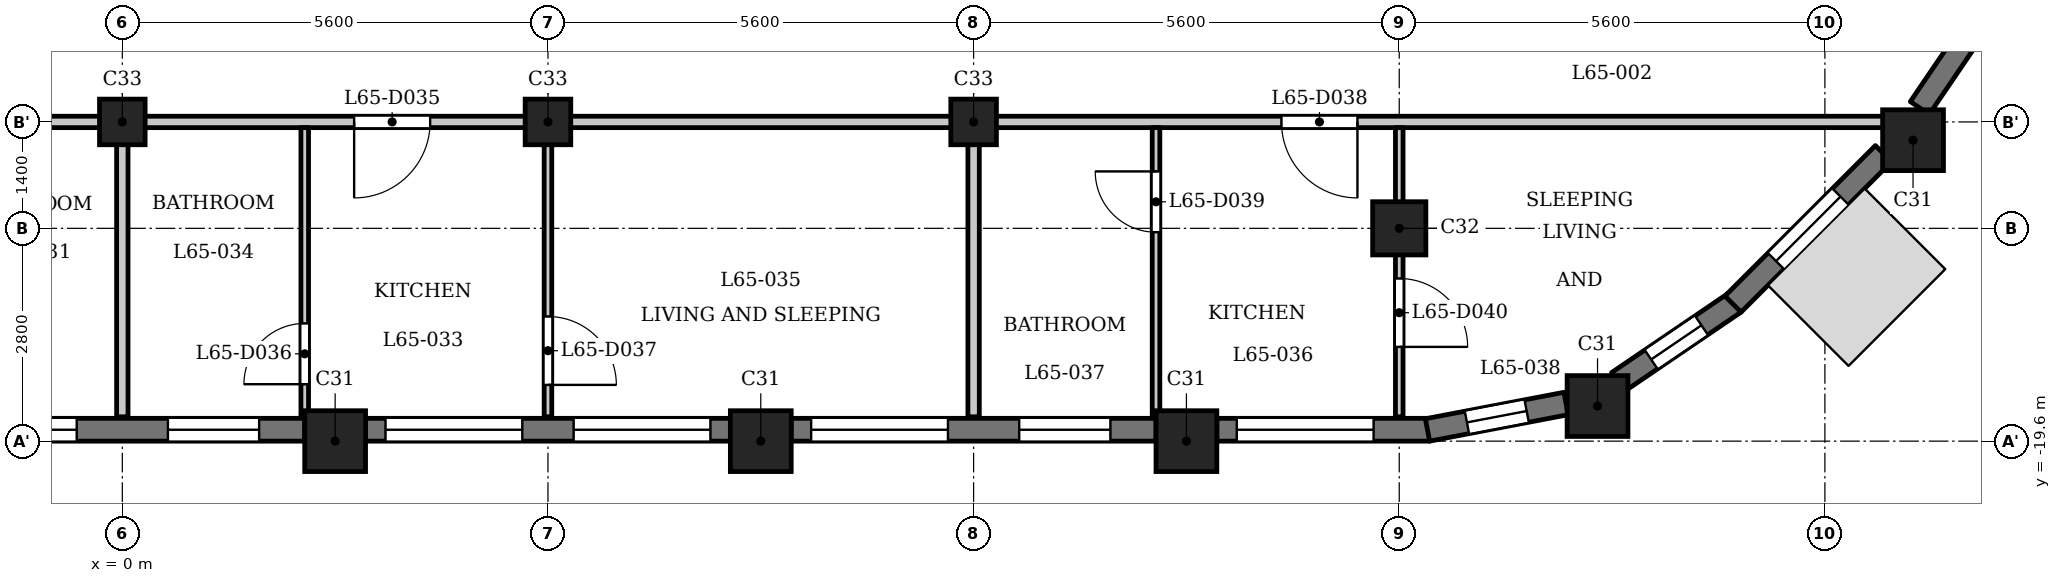
"""IFC4 building model, lengths in metres.
Left out: names, types, materials, properties, quantities, classifications, styles, units other than length and angle.
Written with IfcOpenShell. Run it as: python <this file> out.ifc"""

import sys

from ifc_helpers import new_model, si_unit, direction, frame, frame_2d, origin, origin_2d, place, context, subcontext, project, spatial, rectangle, extrude, element, fill, save


model = new_model("IFC4")
c1 = context("Model", 3, precision=1e-05, world=origin(), true_north=direction((0.0, 1.0)))
c2 = subcontext(c1, "Body", "Model", "MODEL_VIEW")
j1 = project(units=[si_unit("LENGTHUNIT", "METRE"), si_unit("PLANEANGLEUNIT", "RADIAN")], contexts=[c1])
p1 = place(None, origin())
s1 = spatial("IfcSite", under=j1, at=p1, CompositionType="ELEMENT")
p2 = place(p1, origin())
s2 = spatial("IfcBuilding", under=s1, at=p2, CompositionType="ELEMENT")
p3 = place(p2, frame((0.0, 0.0, 252.2)))
s3 = spatial("IfcBuildingStorey", under=s2, at=p3, CompositionType="ELEMENT", Elevation=252.2)
for number, where, z_axis, x_axis in (
    (1, (2.8, -19.6, 0.0), (0.0, 0.0, 1.0), (1.0, 0.0, 0.0)),
    (2, (8.4, -19.6, 0.0), (0.0, 0.0, 1.0), (1.0, 0.0, 0.0)),
    (3, (14.0, -19.6, 0.0), (0.0, 0.0, 1.0), (1.0, 0.0, 0.0)),
    (4, (19.409, -19.138, 0.0), (0.0, 0.0, 1.0), (1.0, 0.0, 0.0)),
    (5, (23.56, -15.64, 0.0), (0.0, 0.0, 1.0), (1.0, 0.0, 0.0)),
):
    element("IfcColumn", number, at=place(p3, frame(where, z_axis=z_axis, x_axis=x_axis)), inside=s3, PredefinedType="COLUMN", context=c2, shape_type="SweptSolid", body=[
        extrude(rectangle(XDim=0.8, YDim=0.8, at=origin_2d()), origin(), (0.0, 0.0, 1.0), 3.5),
    ])
p4 = place(p3, frame((16.8, -16.8, 0.0), z_axis=(0.0, 0.0, 1.0), x_axis=(1.0, 0.0, 0.0)))
e6 = element("IfcColumn", 6, at=p4, inside=s3, PredefinedType="COLUMN", context=c2, shape_type="SweptSolid", body=[
    extrude(rectangle(XDim=0.7, YDim=0.7, at=origin_2d()), origin(), (0.0, 0.0, 1.0), 3.5),
])
for number, where, z_axis, x_axis in (
    (7, (0.0, -15.4, 0.0), (0.0, 0.0, 1.0), (1.0, 0.0, 0.0)),
    (8, (5.6, -15.4, 0.0), (0.0, 0.0, 1.0), (1.0, 0.0, 0.0)),
    (9, (11.2, -15.4, 0.0), (0.0, 0.0, 1.0), (1.0, 0.0, 0.0)),
):
    element("IfcColumn", number, at=place(p3, frame(where, z_axis=z_axis, x_axis=x_axis)), inside=s3, PredefinedType="COLUMN", context=c2, shape_type="SweptSolid", body=[
        extrude(rectangle(XDim=0.6, YDim=0.6, at=origin_2d()), origin(), (0.0, 0.0, 1.0), 3.5),
    ])
p5 = place(p3, frame((-2.4, -19.45, 0.0), z_axis=(0.0, 0.0, 1.0), x_axis=(1.0, 0.0, 0.0)))
e10 = element("IfcWall", 10, at=p5, inside=s3, PredefinedType="SOLIDWALL", context=c2, shape_type="SweptSolid", body=[
    extrude(rectangle(XDim=4.8, YDim=0.3, at=frame_2d((2.4, 0.0))), origin(), (0.0, 0.0, 1.0), 2.55),
])
p6 = place(p5, frame((0.6, 0.0, 0.6)))
e11 = element("IfcOpeningElement", 11, at=p6, cuts=e10, PredefinedType="OPENING", context=c2, shape_type="SweptSolid", body=[
    extrude(rectangle(XDim=1.2, YDim=1.55, at=frame_2d((0.6, 0.775))), frame((0.0, 0.16, 0.0), z_axis=(0.0, -1.0, 0.0), x_axis=(1.0, 0.0, 0.0)), (0.0, 0.0, 1.0), 0.32),
])
p7 = place(p5, frame((3.0, 0.0, 0.6)))
e12 = element("IfcOpeningElement", 12, at=p7, cuts=e10, PredefinedType="OPENING", context=c2, shape_type="SweptSolid", body=[
    extrude(rectangle(XDim=1.2, YDim=1.55, at=frame_2d((0.6, 0.775))), frame((0.0, 0.16, 0.0), z_axis=(0.0, -1.0, 0.0), x_axis=(1.0, 0.0, 0.0)), (0.0, 0.0, 1.0), 0.32),
])
p8 = place(p3, frame((3.2, -19.45, 0.0), z_axis=(0.0, 0.0, 1.0), x_axis=(1.0, 0.0, 0.0)))
e13 = element("IfcWall", 13, at=p8, inside=s3, PredefinedType="SOLIDWALL", context=c2, shape_type="SweptSolid", body=[
    extrude(rectangle(XDim=4.8, YDim=0.3, at=frame_2d((2.4, 0.0))), origin(), (0.0, 0.0, 1.0), 2.55),
])
p9 = place(p8, frame((0.262, 0.0, 0.9)))
e14 = element("IfcOpeningElement", 14, at=p9, cuts=e13, PredefinedType="OPENING", context=c2, shape_type="SweptSolid", body=[
    extrude(rectangle(XDim=1.8, YDim=1.25, at=frame_2d((0.9, 0.625))), frame((0.0, 0.16, 0.0), z_axis=(0.0, -1.0, 0.0), x_axis=(1.0, 0.0, 0.0)), (0.0, 0.0, 1.0), 0.32),
])
p10 = place(p8, frame((2.738, 0.0, 0.9)))
e15 = element("IfcOpeningElement", 15, at=p10, cuts=e13, PredefinedType="OPENING", context=c2, shape_type="SweptSolid", body=[
    extrude(rectangle(XDim=1.8, YDim=1.25, at=frame_2d((0.9, 0.625))), frame((0.0, 0.16, 0.0), z_axis=(0.0, -1.0, 0.0), x_axis=(1.0, 0.0, 0.0)), (0.0, 0.0, 1.0), 0.32),
])
p11 = place(p3, frame((8.8, -19.45, 0.0), z_axis=(0.0, 0.0, 1.0), x_axis=(1.0, 0.0, 0.0)))
e16 = element("IfcWall", 16, at=p11, inside=s3, PredefinedType="SOLIDWALL", context=c2, shape_type="SweptSolid", body=[
    extrude(rectangle(XDim=4.8, YDim=0.3, at=frame_2d((2.4, 0.0))), origin(), (0.0, 0.0, 1.0), 2.55),
])
p12 = place(p11, frame((0.262, 0.0, 0.9)))
e17 = element("IfcOpeningElement", 17, at=p12, cuts=e16, PredefinedType="OPENING", context=c2, shape_type="SweptSolid", body=[
    extrude(rectangle(XDim=1.8, YDim=1.25, at=frame_2d((0.9, 0.625))), frame((0.0, 0.16, 0.0), z_axis=(0.0, -1.0, 0.0), x_axis=(1.0, 0.0, 0.0)), (0.0, 0.0, 1.0), 0.32),
])
p13 = place(p11, frame((3.0, 0.0, 0.6)))
e18 = element("IfcOpeningElement", 18, at=p13, cuts=e16, PredefinedType="OPENING", context=c2, shape_type="SweptSolid", body=[
    extrude(rectangle(XDim=1.2, YDim=1.55, at=frame_2d((0.6, 0.775))), frame((0.0, 0.16, 0.0), z_axis=(0.0, -1.0, 0.0), x_axis=(1.0, 0.0, 0.0)), (0.0, 0.0, 1.0), 0.32),
])
p14 = place(p3, frame((14.4, -19.45, 0.0), z_axis=(0.0, 0.0, 1.0), x_axis=(1.0, 0.0, 0.0)))
e19 = element("IfcWall", 19, at=p14, inside=s3, PredefinedType="SOLIDWALL", context=c2, shape_type="SweptSolid", body=[
    extrude(rectangle(XDim=2.8, YDim=0.3, at=frame_2d((1.4, 0.0))), origin(), (0.0, 0.0, 1.0), 2.55),
])
p15 = place(p14, frame((0.262, 0.0, 0.9)))
e20 = element("IfcOpeningElement", 20, at=p15, cuts=e19, PredefinedType="OPENING", context=c2, shape_type="SweptSolid", body=[
    extrude(rectangle(XDim=1.8, YDim=1.25, at=frame_2d((0.9, 0.625))), frame((0.0, 0.16, 0.0), z_axis=(0.0, -1.0, 0.0), x_axis=(1.0, 0.0, 0.0)), (0.0, 0.0, 1.0), 0.32),
])
p16 = place(p3, frame((17.172, -19.453, 0.0), z_axis=(0.0, 0.0, 1.0), x_axis=(0.982301706131, 0.187305520826, 0.0)))
e21 = element("IfcWall", 21, at=p16, inside=s3, PredefinedType="SOLIDWALL", context=c2, shape_type="SweptSolid", body=[
    extrude(rectangle(XDim=1.856, YDim=0.3, at=frame_2d((0.928, 0.0))), origin(), (0.0, 0.0, 1.0), 2.55),
])
p17 = place(p16, frame((0.528, 0.0, 0.6)))
e22 = element("IfcOpeningElement", 22, at=p17, cuts=e21, PredefinedType="OPENING", context=c2, shape_type="SweptSolid", body=[
    extrude(rectangle(XDim=0.8, YDim=1.55, at=frame_2d((0.4, 0.775))), frame((0.0, 0.16, 0.0), z_axis=(0.0, -1.0, 0.0), x_axis=(1.0, 0.0, 0.0)), (0.0, 0.0, 1.0), 0.32),
])
p18 = place(p3, frame((19.678, -18.822, 0.0), z_axis=(0.0, 0.0, 1.0), x_axis=(0.826997446962, 0.562205676526, 0.0)))
e23 = element("IfcWall", 23, at=p18, inside=s3, PredefinedType="SOLIDWALL", context=c2, shape_type="SweptSolid", body=[
    extrude(rectangle(XDim=1.856, YDim=0.3, at=frame_2d((0.928, 0.0))), origin(), (0.0, 0.0, 1.0), 2.55),
])
p19 = place(p18, frame((0.528, 0.0, 0.6)))
e24 = element("IfcOpeningElement", 24, at=p19, cuts=e23, PredefinedType="OPENING", context=c2, shape_type="SweptSolid", body=[
    extrude(rectangle(XDim=0.8, YDim=1.55, at=frame_2d((0.4, 0.775))), frame((0.0, 0.16, 0.0), z_axis=(0.0, -1.0, 0.0), x_axis=(1.0, 0.0, 0.0)), (0.0, 0.0, 1.0), 0.32),
])
p20 = place(p3, frame((21.191, -17.797, 0.0), z_axis=(0.0, 0.0, 1.0), x_axis=(0.707106781187, 0.707106781187, 0.0)))
e25 = element("IfcWall", 25, at=p20, inside=s3, PredefinedType="SOLIDWALL", context=c2, shape_type="SweptSolid", body=[
    extrude(rectangle(XDim=2.8, YDim=0.3, at=frame_2d((1.4, 0.0))), origin(), (0.0, 0.0, 1.0), 2.55),
])
p21 = place(p20, frame((0.8, 0.0, 0.6)))
e26 = element("IfcOpeningElement", 26, at=p21, cuts=e25, PredefinedType="OPENING", context=c2, shape_type="SweptSolid", body=[
    extrude(rectangle(XDim=1.2, YDim=1.55, at=frame_2d((0.6, 0.775))), frame((0.0, 0.16, 0.0), z_axis=(0.0, -1.0, 0.0), x_axis=(1.0, 0.0, 0.0)), (0.0, 0.0, 1.0), 0.32),
])
p22 = place(p3, frame((23.648, -15.217, 0.0), z_axis=(0.0, 0.0, 1.0), x_axis=(0.562043265151, 0.827107833416, 0.0)))
e27 = element("IfcWall", 27, at=p22, inside=s3, PredefinedType="SOLIDWALL", context=c2, shape_type="SweptSolid", body=[
    extrude(rectangle(XDim=1.377, YDim=0.3, at=frame_2d((0.688, 0.0))), origin(), (0.0, 0.0, 1.0), 2.55),
])
p23 = place(p3, frame((-23.322, -15.4, 0.0), z_axis=(0.0, 0.0, 1.0), x_axis=(1.0, 0.0, 0.0)))
e28 = element("IfcWall", 28, at=p23, inside=s3, PredefinedType="PARTITIONING", context=c2, shape_type="SweptSolid", body=[
    extrude(rectangle(XDim=46.872, YDim=0.15, at=frame_2d((23.436, 0.0))), origin(), (0.0, 0.0, 1.0), 3.2),
])
p24 = place(p23, frame((7.172, 0.0, 0.0)))
e29 = element("IfcOpeningElement", 29, at=p24, cuts=e28, PredefinedType="OPENING", context=c2, shape_type="SweptSolid", body=[
    extrude(rectangle(XDim=1.0, YDim=2.1, at=frame_2d((0.5, 1.05))), frame((0.0, 0.085, 0.0), z_axis=(0.0, -1.0, 0.0), x_axis=(1.0, 0.0, 0.0)), (0.0, 0.0, 1.0), 0.17),
])
p25 = place(p23, frame((19.372, 0.0, 0.0)))
e30 = element("IfcOpeningElement", 30, at=p25, cuts=e28, PredefinedType="OPENING", context=c2, shape_type="SweptSolid", body=[
    extrude(rectangle(XDim=1.0, YDim=2.1, at=frame_2d((0.5, 1.05))), frame((0.0, 0.085, 0.0), z_axis=(0.0, -1.0, 0.0), x_axis=(1.0, 0.0, 0.0)), (0.0, 0.0, 1.0), 0.17),
])
p26 = place(p23, frame((26.372, 0.0, 0.0)))
e31 = element("IfcOpeningElement", 31, at=p26, cuts=e28, PredefinedType="OPENING", context=c2, shape_type="SweptSolid", body=[
    extrude(rectangle(XDim=1.0, YDim=2.1, at=frame_2d((0.5, 1.05))), frame((0.0, 0.085, 0.0), z_axis=(0.0, -1.0, 0.0), x_axis=(1.0, 0.0, 0.0)), (0.0, 0.0, 1.0), 0.17),
])
p27 = place(p23, frame((38.572, 0.0, 0.0)))
e32 = element("IfcOpeningElement", 32, at=p27, cuts=e28, PredefinedType="OPENING", context=c2, shape_type="SweptSolid", body=[
    extrude(rectangle(XDim=1.0, YDim=2.1, at=frame_2d((0.5, 1.05))), frame((0.0, 0.085, 0.0), z_axis=(0.0, -1.0, 0.0), x_axis=(1.0, 0.0, 0.0)), (0.0, 0.0, 1.0), 0.17),
])
p28 = place(p3, frame((0.0, -19.28, 0.0), z_axis=(0.0, 0.0, 1.0), x_axis=(0.0, 1.0, 0.0)))
e33 = element("IfcWall", 33, at=p28, inside=s3, PredefinedType="PARTITIONING", context=c2, shape_type="SweptSolid", body=[
    extrude(rectangle(XDim=3.805, YDim=0.15, at=frame_2d((1.902, 0.0))), origin(), (0.0, 0.0, 1.0), 3.2),
])
p29 = place(p3, frame((2.4, -19.28, 0.0), z_axis=(0.0, 0.0, 1.0), x_axis=(0.0, 1.0, 0.0)))
e34 = element("IfcWall", 34, at=p29, inside=s3, PredefinedType="PARTITIONING", context=c2, shape_type="SweptSolid", body=[
    extrude(rectangle(XDim=3.805, YDim=0.1, at=frame_2d((1.902, 0.0))), origin(), (0.0, 0.0, 1.0), 3.2),
])
p30 = place(p29, frame((0.429, 0.0, 0.0)))
e35 = element("IfcOpeningElement", 35, at=p30, cuts=e34, PredefinedType="OPENING", context=c2, shape_type="SweptSolid", body=[
    extrude(rectangle(XDim=0.8, YDim=2.1, at=frame_2d((0.4, 1.05))), frame((0.0, 0.06, 0.0), z_axis=(0.0, -1.0, 0.0), x_axis=(1.0, 0.0, 0.0)), (0.0, 0.0, 1.0), 0.12),
])
p31 = place(p3, frame((5.6, -19.28, 0.0), z_axis=(0.0, 0.0, 1.0), x_axis=(0.0, 1.0, 0.0)))
e36 = element("IfcWall", 36, at=p31, inside=s3, PredefinedType="PARTITIONING", context=c2, shape_type="SweptSolid", body=[
    extrude(rectangle(XDim=3.805, YDim=0.1, at=frame_2d((1.902, 0.0))), origin(), (0.0, 0.0, 1.0), 3.2),
])
p32 = place(p31, frame((0.42, 0.0, 0.0)))
e37 = element("IfcOpeningElement", 37, at=p32, cuts=e36, PredefinedType="OPENING", context=c2, shape_type="SweptSolid", body=[
    extrude(rectangle(XDim=0.9, YDim=2.1, at=frame_2d((0.45, 1.05))), frame((0.0, 0.06, 0.0), z_axis=(0.0, -1.0, 0.0), x_axis=(1.0, 0.0, 0.0)), (0.0, 0.0, 1.0), 0.12),
])
p33 = place(p3, frame((11.2, -19.28, 0.0), z_axis=(0.0, 0.0, 1.0), x_axis=(0.0, 1.0, 0.0)))
e38 = element("IfcWall", 38, at=p33, inside=s3, PredefinedType="PARTITIONING", context=c2, shape_type="SweptSolid", body=[
    extrude(rectangle(XDim=3.805, YDim=0.15, at=frame_2d((1.902, 0.0))), origin(), (0.0, 0.0, 1.0), 3.2),
])
p34 = place(p3, frame((13.6, -19.28, 0.0), z_axis=(0.0, 0.0, 1.0), x_axis=(0.0, 1.0, 0.0)))
e39 = element("IfcWall", 39, at=p34, inside=s3, PredefinedType="PARTITIONING", context=c2, shape_type="SweptSolid", body=[
    extrude(rectangle(XDim=3.805, YDim=0.1, at=frame_2d((1.902, 0.0))), origin(), (0.0, 0.0, 1.0), 3.2),
])
p35 = place(p34, frame((2.429, 0.0, 0.0)))
e40 = element("IfcOpeningElement", 40, at=p35, cuts=e39, PredefinedType="OPENING", context=c2, shape_type="SweptSolid", body=[
    extrude(rectangle(XDim=0.8, YDim=2.1, at=frame_2d((0.4, 1.05))), frame((0.0, 0.06, 0.0), z_axis=(0.0, -1.0, 0.0), x_axis=(1.0, 0.0, 0.0)), (0.0, 0.0, 1.0), 0.12),
])
p36 = place(p3, frame((16.8, -19.28, 0.0), z_axis=(0.0, 0.0, 1.0), x_axis=(0.0, 1.0, 0.0)))
e41 = element("IfcWall", 41, at=p36, inside=s3, PredefinedType="PARTITIONING", context=c2, shape_type="SweptSolid", body=[
    extrude(rectangle(XDim=3.805, YDim=0.1, at=frame_2d((1.902, 0.0))), origin(), (0.0, 0.0, 1.0), 3.2),
])
p37 = place(p36, frame((0.92, 0.0, 0.0)))
e42 = element("IfcOpeningElement", 42, at=p37, cuts=e41, PredefinedType="OPENING", context=c2, shape_type="SweptSolid", body=[
    extrude(rectangle(XDim=0.9, YDim=2.1, at=frame_2d((0.45, 1.05))), frame((0.0, 0.06, 0.0), z_axis=(0.0, -1.0, 0.0), x_axis=(1.0, 0.0, 0.0)), (0.0, 0.0, 1.0), 0.12),
])
p38 = place(p26, origin())
e43 = element("IfcDoor", 43, at=p38, inside=s3, OperationType="SINGLE_SWING_LEFT", PredefinedType="DOOR", context=c2, shape_type="SweptSolid", body=[
    extrude(rectangle(XDim=1.0, YDim=2.1, at=frame_2d((0.5, 1.05))), frame((0.0, 0.025, 0.0), z_axis=(0.0, -1.0, 0.0), x_axis=(1.0, 0.0, 0.0)), (0.0, 0.0, 1.0), 0.05),
])
fill(e31, e43)
p39 = place(p30, origin())
e44 = element("IfcDoor", 44, at=p39, inside=s3, OperationType="SINGLE_SWING_RIGHT", PredefinedType="DOOR", context=c2, shape_type="SweptSolid", body=[
    extrude(rectangle(XDim=0.8, YDim=2.1, at=frame_2d((0.4, 1.05))), frame((0.0, 0.025, 0.0), z_axis=(0.0, -1.0, 0.0), x_axis=(1.0, 0.0, 0.0)), (0.0, 0.0, 1.0), 0.05),
])
fill(e35, e44)
p40 = place(p32, origin())
e45 = element("IfcDoor", 45, at=p40, inside=s3, OperationType="SINGLE_SWING_LEFT", PredefinedType="DOOR", context=c2, shape_type="SweptSolid", body=[
    extrude(rectangle(XDim=0.9, YDim=2.1, at=frame_2d((0.45, 1.05))), frame((0.0, 0.025, 0.0), z_axis=(0.0, -1.0, 0.0), x_axis=(1.0, 0.0, 0.0)), (0.0, 0.0, 1.0), 0.05),
])
fill(e37, e45)
p41 = place(p27, origin())
e46 = element("IfcDoor", 46, at=p41, inside=s3, OperationType="SINGLE_SWING_RIGHT", PredefinedType="DOOR", context=c2, shape_type="SweptSolid", body=[
    extrude(rectangle(XDim=1.0, YDim=2.1, at=frame_2d((0.5, 1.05))), frame((0.0, 0.025, 0.0), z_axis=(0.0, -1.0, 0.0), x_axis=(1.0, 0.0, 0.0)), (0.0, 0.0, 1.0), 0.05),
])
fill(e32, e46)
p42 = place(p35, origin())
e47 = element("IfcDoor", 47, at=p42, inside=s3, OperationType="SINGLE_SWING_LEFT", PredefinedType="DOOR", context=c2, shape_type="SweptSolid", body=[
    extrude(rectangle(XDim=0.8, YDim=2.1, at=frame_2d((0.4, 1.05))), frame((0.0, 0.025, 0.0), z_axis=(0.0, -1.0, 0.0), x_axis=(1.0, 0.0, 0.0)), (0.0, 0.0, 1.0), 0.05),
])
fill(e40, e47)
p43 = place(p37, origin())
e48 = element("IfcDoor", 48, at=p43, inside=s3, OperationType="SINGLE_SWING_LEFT", PredefinedType="DOOR", context=c2, shape_type="SweptSolid", body=[
    extrude(rectangle(XDim=0.9, YDim=2.1, at=frame_2d((0.45, 1.05))), frame((0.0, 0.025, 0.0), z_axis=(0.0, -1.0, 0.0), x_axis=(1.0, 0.0, 0.0)), (0.0, 0.0, 1.0), 0.05),
])
fill(e42, e48)
p44 = place(p6, origin())
e49 = element("IfcWindow", 49, at=p44, inside=s3, PartitioningType="SINGLE_PANEL", PredefinedType="WINDOW", context=c2, shape_type="SweptSolid", body=[
    extrude(rectangle(XDim=1.2, YDim=1.55, at=frame_2d((0.6, 0.775))), frame((0.0, 0.03, 0.0), z_axis=(0.0, -1.0, 0.0), x_axis=(1.0, 0.0, 0.0)), (0.0, 0.0, 1.0), 0.06),
])
fill(e11, e49)
p45 = place(p7, origin())
e50 = element("IfcWindow", 50, at=p45, inside=s3, PartitioningType="SINGLE_PANEL", PredefinedType="WINDOW", context=c2, shape_type="SweptSolid", body=[
    extrude(rectangle(XDim=1.2, YDim=1.55, at=frame_2d((0.6, 0.775))), frame((0.0, 0.03, 0.0), z_axis=(0.0, -1.0, 0.0), x_axis=(1.0, 0.0, 0.0)), (0.0, 0.0, 1.0), 0.06),
])
fill(e12, e50)
p46 = place(p9, origin())
e51 = element("IfcWindow", 51, at=p46, inside=s3, PartitioningType="SINGLE_PANEL", PredefinedType="WINDOW", context=c2, shape_type="SweptSolid", body=[
    extrude(rectangle(XDim=1.8, YDim=1.25, at=frame_2d((0.9, 0.625))), frame((0.0, 0.03, 0.0), z_axis=(0.0, -1.0, 0.0), x_axis=(1.0, 0.0, 0.0)), (0.0, 0.0, 1.0), 0.06),
])
fill(e14, e51)
p47 = place(p10, origin())
e52 = element("IfcWindow", 52, at=p47, inside=s3, PartitioningType="SINGLE_PANEL", PredefinedType="WINDOW", context=c2, shape_type="SweptSolid", body=[
    extrude(rectangle(XDim=1.8, YDim=1.25, at=frame_2d((0.9, 0.625))), frame((0.0, 0.03, 0.0), z_axis=(0.0, -1.0, 0.0), x_axis=(1.0, 0.0, 0.0)), (0.0, 0.0, 1.0), 0.06),
])
fill(e15, e52)
p48 = place(p12, origin())
e53 = element("IfcWindow", 53, at=p48, inside=s3, PartitioningType="SINGLE_PANEL", PredefinedType="WINDOW", context=c2, shape_type="SweptSolid", body=[
    extrude(rectangle(XDim=1.8, YDim=1.25, at=frame_2d((0.9, 0.625))), frame((0.0, 0.03, 0.0), z_axis=(0.0, -1.0, 0.0), x_axis=(1.0, 0.0, 0.0)), (0.0, 0.0, 1.0), 0.06),
])
fill(e17, e53)
p49 = place(p13, origin())
e54 = element("IfcWindow", 54, at=p49, inside=s3, PartitioningType="SINGLE_PANEL", PredefinedType="WINDOW", context=c2, shape_type="SweptSolid", body=[
    extrude(rectangle(XDim=1.2, YDim=1.55, at=frame_2d((0.6, 0.775))), frame((0.0, 0.03, 0.0), z_axis=(0.0, -1.0, 0.0), x_axis=(1.0, 0.0, 0.0)), (0.0, 0.0, 1.0), 0.06),
])
fill(e18, e54)
p50 = place(p15, origin())
e55 = element("IfcWindow", 55, at=p50, inside=s3, PartitioningType="SINGLE_PANEL", PredefinedType="WINDOW", context=c2, shape_type="SweptSolid", body=[
    extrude(rectangle(XDim=1.8, YDim=1.25, at=frame_2d((0.9, 0.625))), frame((0.0, 0.03, 0.0), z_axis=(0.0, -1.0, 0.0), x_axis=(1.0, 0.0, 0.0)), (0.0, 0.0, 1.0), 0.06),
])
fill(e20, e55)
p51 = place(p17, origin())
e56 = element("IfcWindow", 56, at=p51, inside=s3, PartitioningType="SINGLE_PANEL", PredefinedType="WINDOW", context=c2, shape_type="SweptSolid", body=[
    extrude(rectangle(XDim=0.8, YDim=1.55, at=frame_2d((0.4, 0.775))), frame((0.0, 0.03, 0.0), z_axis=(0.0, -1.0, 0.0), x_axis=(1.0, 0.0, 0.0)), (0.0, 0.0, 1.0), 0.06),
])
fill(e22, e56)
p52 = place(p19, origin())
e57 = element("IfcWindow", 57, at=p52, inside=s3, PartitioningType="SINGLE_PANEL", PredefinedType="WINDOW", context=c2, shape_type="SweptSolid", body=[
    extrude(rectangle(XDim=0.8, YDim=1.55, at=frame_2d((0.4, 0.775))), frame((0.0, 0.03, 0.0), z_axis=(0.0, -1.0, 0.0), x_axis=(1.0, 0.0, 0.0)), (0.0, 0.0, 1.0), 0.06),
])
fill(e24, e57)
p53 = place(p21, origin())
e58 = element("IfcWindow", 58, at=p53, inside=s3, PartitioningType="SINGLE_PANEL", PredefinedType="WINDOW", context=c2, shape_type="SweptSolid", body=[
    extrude(rectangle(XDim=1.2, YDim=1.55, at=frame_2d((0.6, 0.775))), frame((0.0, 0.03, 0.0), z_axis=(0.0, -1.0, 0.0), x_axis=(1.0, 0.0, 0.0)), (0.0, 0.0, 1.0), 0.06),
])
fill(e26, e58)
save(model, sys.argv[1])
